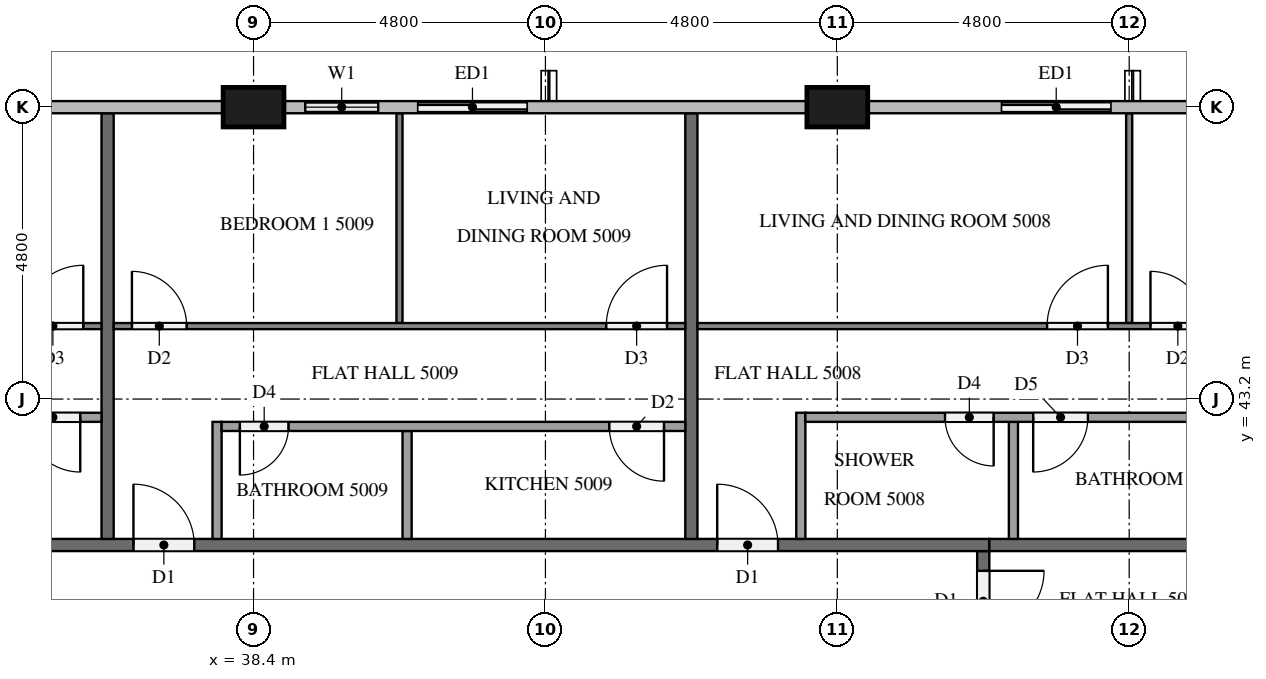
"""IFC4 building model, lengths in metres.
Left out: names, types, materials, properties, quantities, classifications, styles, units other than length and angle.
Written with IfcOpenShell. Run it as: python <this file> out.ifc"""

import sys

from ifc_helpers import new_model, si_unit, direction, frame, frame_2d, origin, origin_2d, place, context, subcontext, project, spatial, rectangle, extrude, element, fill, save


model = new_model("IFC4")
c1 = context("Model", 3, precision=1e-05, world=origin(), true_north=direction((0.0, 1.0)))
c2 = subcontext(c1, "Body", "Model", "MODEL_VIEW")
j1 = project(units=[si_unit("LENGTHUNIT", "METRE"), si_unit("PLANEANGLEUNIT", "RADIAN")], contexts=[c1])
p1 = place(None, origin())
s1 = spatial("IfcSite", under=j1, at=p1, CompositionType="ELEMENT")
p2 = place(p1, origin())
s2 = spatial("IfcBuilding", under=s1, at=p2, CompositionType="ELEMENT")
p3 = place(p2, frame((0.0, 0.0, 192.9)))
s3 = spatial("IfcBuildingStorey", under=s2, at=p3, CompositionType="ELEMENT", Elevation=192.9)
for number, where, z_axis, x_axis in (
    (1, (48.0, 48.0, 0.0), (0.0, 0.0, 1.0), (1.0, 0.0, 0.0)),
    (2, (38.4, 48.0, 0.0), (0.0, 0.0, 1.0), (1.0, 0.0, 0.0)),
):
    element("IfcColumn", number, at=place(p3, frame(where, z_axis=z_axis, x_axis=x_axis)), inside=s3, PredefinedType="COLUMN", context=c2, shape_type="SweptSolid", body=[
        extrude(rectangle(XDim=1.0, YDim=0.65, at=origin_2d()), origin(), (0.0, 0.0, 1.0), 3.2),
    ])
p4 = place(p3, frame((52.8, 48.0, 0.0), z_axis=(0.0, 0.0, 1.0), x_axis=(-1.0, 0.0, 0.0)))
e3 = element("IfcWall", 3, at=p4, inside=s3, PredefinedType="SOLIDWALL", context=c2, shape_type="SweptSolid", body=[
    extrude(rectangle(XDim=2.4, YDim=0.15, at=frame_2d((1.2, 0.0))), origin(), (0.0, 0.0, 1.0), 3.2),
])
p5 = place(p4, frame((0.3, 0.0, 0.0)))
e4 = element("IfcOpeningElement", 4, at=p5, cuts=e3, PredefinedType="OPENING", context=c2, shape_type="SweptSolid", body=[
    extrude(rectangle(XDim=1.8, YDim=2.4, at=frame_2d((0.9, 1.2))), frame((0.0, 0.085, 0.0), z_axis=(0.0, -1.0, 0.0), x_axis=(1.0, 0.0, 0.0)), (0.0, 0.0, 1.0), 0.17),
])
p6 = place(p3, frame((43.2, 48.0, 0.0), z_axis=(0.0, 0.0, 1.0), x_axis=(-1.0, 0.0, 0.0)))
e5 = element("IfcWall", 5, at=p6, inside=s3, PredefinedType="SOLIDWALL", context=c2, shape_type="SweptSolid", body=[
    extrude(rectangle(XDim=4.3, YDim=0.15, at=frame_2d((2.15, 0.0))), origin(), (0.0, 0.0, 1.0), 3.2),
])
p7 = place(p6, frame((0.3, 0.0, 0.0)))
e6 = element("IfcOpeningElement", 6, at=p7, cuts=e5, PredefinedType="OPENING", context=c2, shape_type="SweptSolid", body=[
    extrude(rectangle(XDim=1.8, YDim=2.4, at=frame_2d((0.9, 1.2))), frame((0.0, 0.085, 0.0), z_axis=(0.0, -1.0, 0.0), x_axis=(1.0, 0.0, 0.0)), (0.0, 0.0, 1.0), 0.17),
])
p8 = place(p6, frame((2.75, 0.0, 0.9)))
e7 = element("IfcOpeningElement", 7, at=p8, cuts=e5, PredefinedType="OPENING", context=c2, shape_type="SweptSolid", body=[
    extrude(rectangle(XDim=1.2, YDim=1.4, at=frame_2d((0.6, 0.7))), frame((0.0, 0.085, 0.0), z_axis=(0.0, -1.0, 0.0), x_axis=(1.0, 0.0, 0.0)), (0.0, 0.0, 1.0), 0.17),
])
p9 = place(p3, frame((50.4, 40.7, 0.0), z_axis=(0.0, 0.0, 1.0), x_axis=(0.0, -1.0, 0.0)))
e8 = element("IfcWall", 8, at=p9, inside=s3, PredefinedType="PARTITIONING", context=c2, shape_type="SweptSolid", body=[
    extrude(rectangle(XDim=28.6, YDim=0.2, at=frame_2d((14.3, 0.0))), origin(), (0.0, 0.0, 1.0), 3.2),
])
p10 = place(p9, frame((21.925, 0.0, 0.0)))
e9 = element("IfcOpeningElement", 9, at=p10, cuts=e8, PredefinedType="OPENING", context=c2, shape_type="SweptSolid", body=[
    extrude(rectangle(XDim=1.0, YDim=2.1, at=frame_2d((0.5, 1.05))), frame((0.0, 0.11, 0.0), z_axis=(0.0, -1.0, 0.0), x_axis=(1.0, 0.0, 0.0)), (0.0, 0.0, 1.0), 0.22),
])
p11 = place(p9, frame((20.075, 0.0, 0.0)))
e10 = element("IfcOpeningElement", 10, at=p11, cuts=e8, PredefinedType="OPENING", context=c2, shape_type="SweptSolid", body=[
    extrude(rectangle(XDim=1.0, YDim=2.1, at=frame_2d((0.5, 1.05))), frame((0.0, 0.11, 0.0), z_axis=(0.0, -1.0, 0.0), x_axis=(1.0, 0.0, 0.0)), (0.0, 0.0, 1.0), 0.22),
])
p12 = place(p9, frame((0.325, 0.0, 0.0)))
e11 = element("IfcOpeningElement", 11, at=p12, cuts=e8, PredefinedType="OPENING", context=c2, shape_type="SweptSolid", body=[
    extrude(rectangle(XDim=1.0, YDim=2.1, at=frame_2d((0.5, 1.05))), frame((0.0, 0.11, 0.0), z_axis=(0.0, -1.0, 0.0), x_axis=(1.0, 0.0, 0.0)), (0.0, 0.0, 1.0), 0.22),
])
p13 = place(p3, frame((11.9, 40.8, 0.0), z_axis=(0.0, 0.0, 1.0), x_axis=(1.0, 0.0, 0.0)))
e12 = element("IfcWall", 12, at=p13, inside=s3, PredefinedType="PARTITIONING", context=c2, shape_type="SweptSolid", body=[
    extrude(rectangle(XDim=38.6, YDim=0.2, at=frame_2d((19.3, 0.0))), origin(), (0.0, 0.0, 1.0), 3.2),
])
p14 = place(p13, frame((34.125, 0.0, 0.0)))
e13 = element("IfcOpeningElement", 13, at=p14, cuts=e12, PredefinedType="OPENING", context=c2, shape_type="SweptSolid", body=[
    extrude(rectangle(XDim=1.0, YDim=2.1, at=frame_2d((0.5, 1.05))), frame((0.0, 0.11, 0.0), z_axis=(0.0, -1.0, 0.0), x_axis=(1.0, 0.0, 0.0)), (0.0, 0.0, 1.0), 0.22),
])
p15 = place(p13, frame((24.525, 0.0, 0.0)))
e14 = element("IfcOpeningElement", 14, at=p15, cuts=e12, PredefinedType="OPENING", context=c2, shape_type="SweptSolid", body=[
    extrude(rectangle(XDim=1.0, YDim=2.1, at=frame_2d((0.5, 1.05))), frame((0.0, 0.11, 0.0), z_axis=(0.0, -1.0, 0.0), x_axis=(1.0, 0.0, 0.0)), (0.0, 0.0, 1.0), 0.22),
])
p16 = place(p13, frame((7.725, 0.0, 0.0)))
e15 = element("IfcOpeningElement", 15, at=p16, cuts=e12, PredefinedType="OPENING", context=c2, shape_type="SweptSolid", body=[
    extrude(rectangle(XDim=1.0, YDim=2.1, at=frame_2d((0.5, 1.05))), frame((0.0, 0.11, 0.0), z_axis=(0.0, -1.0, 0.0), x_axis=(1.0, 0.0, 0.0)), (0.0, 0.0, 1.0), 0.22),
])
p17 = place(p13, frame((5.875, 0.0, 0.0)))
e16 = element("IfcOpeningElement", 16, at=p17, cuts=e12, PredefinedType="OPENING", context=c2, shape_type="SweptSolid", body=[
    extrude(rectangle(XDim=1.0, YDim=2.1, at=frame_2d((0.5, 1.05))), frame((0.0, 0.11, 0.0), z_axis=(0.0, -1.0, 0.0), x_axis=(1.0, 0.0, 0.0)), (0.0, 0.0, 1.0), 0.22),
])
p18 = place(p3, frame((50.5, 40.8, 0.0), z_axis=(0.0, 0.0, 1.0), x_axis=(1.0, 0.0, 0.0)))
e17 = element("IfcWall", 17, at=p18, inside=s3, PredefinedType="PARTITIONING", context=c2, shape_type="SweptSolid", body=[
    extrude(rectangle(XDim=11.8, YDim=0.2, at=frame_2d((5.9, 0.0))), origin(), (0.0, 0.0, 1.0), 3.2),
])
for number, where, z_axis, x_axis in (
    (18, (45.6, 47.9, 0.0), (0.0, 0.0, 1.0), (0.0, -1.0, 0.0)),
    (19, (36.0, 47.9, 0.0), (0.0, 0.0, 1.0), (0.0, -1.0, 0.0)),
):
    element("IfcWall", number, at=place(p3, frame(where, z_axis=z_axis, x_axis=x_axis)), inside=s3, PredefinedType="PARTITIONING", context=c2, shape_type="SweptSolid", body=[
        extrude(rectangle(XDim=7.0, YDim=0.2, at=frame_2d((3.5, 0.0))), origin(), (0.0, 0.0, 1.0), 3.2),
    ])
p19 = place(p3, frame((52.8, 44.45, 0.0), z_axis=(0.0, 0.0, 1.0), x_axis=(0.0, 1.0, 0.0)))
e20 = element("IfcWall", 20, at=p19, inside=s3, PredefinedType="PARTITIONING", context=c2, shape_type="SweptSolid", body=[
    extrude(rectangle(XDim=3.45, YDim=0.1, at=frame_2d((1.725, 0.0))), origin(), (0.0, 0.0, 1.0), 3.2),
])
p20 = place(p3, frame((45.7, 44.4, 0.0), z_axis=(0.0, 0.0, 1.0), x_axis=(1.0, 0.0, 0.0)))
e21 = element("IfcWall", 21, at=p20, inside=s3, PredefinedType="PARTITIONING", context=c2, shape_type="SweptSolid", body=[
    extrude(rectangle(XDim=16.279, YDim=0.1, at=frame_2d((8.139, 0.0))), origin(), (0.0, 0.0, 1.0), 3.2),
])
p21 = place(p20, frame((5.75, 0.0, 0.0)))
e22 = element("IfcOpeningElement", 22, at=p21, cuts=e21, PredefinedType="OPENING", context=c2, shape_type="SweptSolid", body=[
    extrude(rectangle(XDim=1.0, YDim=2.1, at=frame_2d((0.5, 1.05))), frame((0.0, 0.06, 0.0), z_axis=(0.0, -1.0, 0.0), x_axis=(1.0, 0.0, 0.0)), (0.0, 0.0, 1.0), 0.12),
])
p22 = place(p20, frame((7.45, 0.0, 0.0)))
e23 = element("IfcOpeningElement", 23, at=p22, cuts=e21, PredefinedType="OPENING", context=c2, shape_type="SweptSolid", body=[
    extrude(rectangle(XDim=0.9, YDim=2.1, at=frame_2d((0.45, 1.05))), frame((0.0, 0.06, 0.0), z_axis=(0.0, -1.0, 0.0), x_axis=(1.0, 0.0, 0.0)), (0.0, 0.0, 1.0), 0.12),
])
p23 = place(p20, frame((15.079, 0.0, 0.0)))
e24 = element("IfcOpeningElement", 24, at=p23, cuts=e21, PredefinedType="OPENING", context=c2, shape_type="SweptSolid", body=[
    extrude(rectangle(XDim=0.9, YDim=2.1, at=frame_2d((0.45, 1.05))), frame((0.0, 0.06, 0.0), z_axis=(0.0, -1.0, 0.0), x_axis=(1.0, 0.0, 0.0)), (0.0, 0.0, 1.0), 0.12),
])
p24 = place(p3, frame((50.896, 40.9, 0.0), z_axis=(0.0, 0.0, 1.0), x_axis=(0.0, 1.0, 0.0)))
e25 = element("IfcWall", 25, at=p24, inside=s3, PredefinedType="PARTITIONING", context=c2, shape_type="SweptSolid", body=[
    extrude(rectangle(XDim=1.925, YDim=0.15, at=frame_2d((0.962, 0.0))), origin(), (0.0, 0.0, 1.0), 3.2),
])
p25 = place(p3, frame((47.4, 40.9, 0.0), z_axis=(0.0, 0.0, 1.0), x_axis=(0.0, 1.0, 0.0)))
e26 = element("IfcWall", 26, at=p25, inside=s3, PredefinedType="PARTITIONING", context=c2, shape_type="SweptSolid", body=[
    extrude(rectangle(XDim=2.075, YDim=0.15, at=frame_2d((1.038, 0.0))), origin(), (0.0, 0.0, 1.0), 3.2),
])
p26 = place(p3, frame((61.925, 42.9, 0.0), z_axis=(0.0, 0.0, 1.0), x_axis=(-1.0, 0.0, 0.0)))
e27 = element("IfcWall", 27, at=p26, inside=s3, PredefinedType="PARTITIONING", context=c2, shape_type="SweptSolid", body=[
    extrude(rectangle(XDim=14.45, YDim=0.15, at=frame_2d((7.225, 0.0))), origin(), (0.0, 0.0, 1.0), 3.2),
])
p27 = place(p26, frame((11.354, 0.0, 0.0)))
e28 = element("IfcOpeningElement", 28, at=p27, cuts=e27, PredefinedType="OPENING", context=c2, shape_type="SweptSolid", body=[
    extrude(rectangle(XDim=0.8, YDim=2.1, at=frame_2d((0.4, 1.05))), frame((0.0, 0.085, 0.0), z_axis=(0.0, -1.0, 0.0), x_axis=(1.0, 0.0, 0.0)), (0.0, 0.0, 1.0), 0.17),
])
p28 = place(p26, frame((9.804, 0.0, 0.0)))
e29 = element("IfcOpeningElement", 29, at=p28, cuts=e27, PredefinedType="OPENING", context=c2, shape_type="SweptSolid", body=[
    extrude(rectangle(XDim=0.9, YDim=2.1, at=frame_2d((0.45, 1.05))), frame((0.0, 0.085, 0.0), z_axis=(0.0, -1.0, 0.0), x_axis=(1.0, 0.0, 0.0)), (0.0, 0.0, 1.0), 0.17),
])
p29 = place(p26, frame((0.3, 0.0, 0.0)))
e30 = element("IfcOpeningElement", 30, at=p29, cuts=e27, PredefinedType="OPENING", context=c2, shape_type="SweptSolid", body=[
    extrude(rectangle(XDim=0.9, YDim=2.1, at=frame_2d((0.45, 1.05))), frame((0.0, 0.085, 0.0), z_axis=(0.0, -1.0, 0.0), x_axis=(1.0, 0.0, 0.0)), (0.0, 0.0, 1.0), 0.17),
])
p30 = place(p3, frame((40.8, 44.45, 0.0), z_axis=(0.0, 0.0, 1.0), x_axis=(0.0, 1.0, 0.0)))
e31 = element("IfcWall", 31, at=p30, inside=s3, PredefinedType="PARTITIONING", context=c2, shape_type="SweptSolid", body=[
    extrude(rectangle(XDim=3.45, YDim=0.1, at=frame_2d((1.725, 0.0))), origin(), (0.0, 0.0, 1.0), 3.2),
])
p31 = place(p3, frame((36.1, 44.4, 0.0), z_axis=(0.0, 0.0, 1.0), x_axis=(1.0, 0.0, 0.0)))
e32 = element("IfcWall", 32, at=p31, inside=s3, PredefinedType="PARTITIONING", context=c2, shape_type="SweptSolid", body=[
    extrude(rectangle(XDim=9.4, YDim=0.1, at=frame_2d((4.7, 0.0))), origin(), (0.0, 0.0, 1.0), 3.2),
])
p32 = place(p31, frame((0.3, 0.0, 0.0)))
e33 = element("IfcOpeningElement", 33, at=p32, cuts=e32, PredefinedType="OPENING", context=c2, shape_type="SweptSolid", body=[
    extrude(rectangle(XDim=0.9, YDim=2.1, at=frame_2d((0.45, 1.05))), frame((0.0, 0.06, 0.0), z_axis=(0.0, -1.0, 0.0), x_axis=(1.0, 0.0, 0.0)), (0.0, 0.0, 1.0), 0.12),
])
p33 = place(p31, frame((8.1, 0.0, 0.0)))
e34 = element("IfcOpeningElement", 34, at=p33, cuts=e32, PredefinedType="OPENING", context=c2, shape_type="SweptSolid", body=[
    extrude(rectangle(XDim=1.0, YDim=2.1, at=frame_2d((0.5, 1.05))), frame((0.0, 0.06, 0.0), z_axis=(0.0, -1.0, 0.0), x_axis=(1.0, 0.0, 0.0)), (0.0, 0.0, 1.0), 0.12),
])
p34 = place(p3, frame((40.925, 40.9, 0.0), z_axis=(0.0, 0.0, 1.0), x_axis=(0.0, 1.0, 0.0)))
e35 = element("IfcWall", 35, at=p34, inside=s3, PredefinedType="PARTITIONING", context=c2, shape_type="SweptSolid", body=[
    extrude(rectangle(XDim=1.775, YDim=0.15, at=frame_2d((0.888, 0.0))), origin(), (0.0, 0.0, 1.0), 3.2),
])
p35 = place(p3, frame((37.8, 40.9, 0.0), z_axis=(0.0, 0.0, 1.0), x_axis=(0.0, 1.0, 0.0)))
e36 = element("IfcWall", 36, at=p35, inside=s3, PredefinedType="PARTITIONING", context=c2, shape_type="SweptSolid", body=[
    extrude(rectangle(XDim=1.925, YDim=0.15, at=frame_2d((0.962, 0.0))), origin(), (0.0, 0.0, 1.0), 3.2),
])
p36 = place(p3, frame((45.5, 42.75, 0.0), z_axis=(0.0, 0.0, 1.0), x_axis=(-1.0, 0.0, 0.0)))
e37 = element("IfcWall", 37, at=p36, inside=s3, PredefinedType="PARTITIONING", context=c2, shape_type="SweptSolid", body=[
    extrude(rectangle(XDim=7.625, YDim=0.15, at=frame_2d((3.812, 0.0))), origin(), (0.0, 0.0, 1.0), 3.2),
])
p37 = place(p36, frame((6.525, 0.0, 0.0)))
e38 = element("IfcOpeningElement", 38, at=p37, cuts=e37, PredefinedType="OPENING", context=c2, shape_type="SweptSolid", body=[
    extrude(rectangle(XDim=0.8, YDim=2.1, at=frame_2d((0.4, 1.05))), frame((0.0, 0.085, 0.0), z_axis=(0.0, -1.0, 0.0), x_axis=(1.0, 0.0, 0.0)), (0.0, 0.0, 1.0), 0.17),
])
p38 = place(p36, frame((0.35, 0.0, 0.0)))
e39 = element("IfcOpeningElement", 39, at=p38, cuts=e37, PredefinedType="OPENING", context=c2, shape_type="SweptSolid", body=[
    extrude(rectangle(XDim=0.9, YDim=2.1, at=frame_2d((0.45, 1.05))), frame((0.0, 0.085, 0.0), z_axis=(0.0, -1.0, 0.0), x_axis=(1.0, 0.0, 0.0)), (0.0, 0.0, 1.0), 0.17),
])
p39 = place(p3, frame((19.3, 44.4, 0.0), z_axis=(0.0, 0.0, 1.0), x_axis=(1.0, 0.0, 0.0)))
e40 = element("IfcWall", 40, at=p39, inside=s3, PredefinedType="PARTITIONING", context=c2, shape_type="SweptSolid", body=[
    extrude(rectangle(XDim=16.6, YDim=0.1, at=frame_2d((8.3, 0.0))), origin(), (0.0, 0.0, 1.0), 3.2),
])
p40 = place(p39, frame((3.45, 0.0, 0.0)))
e41 = element("IfcOpeningElement", 41, at=p40, cuts=e40, PredefinedType="OPENING", context=c2, shape_type="SweptSolid", body=[
    extrude(rectangle(XDim=0.9, YDim=2.1, at=frame_2d((0.45, 1.05))), frame((0.0, 0.06, 0.0), z_axis=(0.0, -1.0, 0.0), x_axis=(1.0, 0.0, 0.0)), (0.0, 0.0, 1.0), 0.12),
])
p41 = place(p39, frame((5.05, 0.0, 0.0)))
e42 = element("IfcOpeningElement", 42, at=p41, cuts=e40, PredefinedType="OPENING", context=c2, shape_type="SweptSolid", body=[
    extrude(rectangle(XDim=0.9, YDim=2.1, at=frame_2d((0.45, 1.05))), frame((0.0, 0.06, 0.0), z_axis=(0.0, -1.0, 0.0), x_axis=(1.0, 0.0, 0.0)), (0.0, 0.0, 1.0), 0.12),
])
p42 = place(p39, frame((15.3, 0.0, 0.0)))
e43 = element("IfcOpeningElement", 43, at=p42, cuts=e40, PredefinedType="OPENING", context=c2, shape_type="SweptSolid", body=[
    extrude(rectangle(XDim=1.0, YDim=2.1, at=frame_2d((0.5, 1.05))), frame((0.0, 0.06, 0.0), z_axis=(0.0, -1.0, 0.0), x_axis=(1.0, 0.0, 0.0)), (0.0, 0.0, 1.0), 0.12),
])
p43 = place(p3, frame((35.9, 42.9, 0.0), z_axis=(0.0, 0.0, 1.0), x_axis=(-1.0, 0.0, 0.0)))
e44 = element("IfcWall", 44, at=p43, inside=s3, PredefinedType="PARTITIONING", context=c2, shape_type="SweptSolid", body=[
    extrude(rectangle(XDim=14.825, YDim=0.15, at=frame_2d((7.413, 0.0))), origin(), (0.0, 0.0, 1.0), 3.2),
])
p44 = place(p43, frame((8.308, 0.0, 0.0)))
e45 = element("IfcOpeningElement", 45, at=p44, cuts=e44, PredefinedType="OPENING", context=c2, shape_type="SweptSolid", body=[
    extrude(rectangle(XDim=0.9, YDim=2.1, at=frame_2d((0.45, 1.05))), frame((0.0, 0.085, 0.0), z_axis=(0.0, -1.0, 0.0), x_axis=(1.0, 0.0, 0.0)), (0.0, 0.0, 1.0), 0.17),
])
p45 = place(p43, frame((6.858, 0.0, 0.0)))
e46 = element("IfcOpeningElement", 46, at=p45, cuts=e44, PredefinedType="OPENING", context=c2, shape_type="SweptSolid", body=[
    extrude(rectangle(XDim=0.8, YDim=2.1, at=frame_2d((0.4, 1.05))), frame((0.0, 0.085, 0.0), z_axis=(0.0, -1.0, 0.0), x_axis=(1.0, 0.0, 0.0)), (0.0, 0.0, 1.0), 0.17),
])
p46 = place(p43, frame((0.35, 0.0, 0.0)))
e47 = element("IfcOpeningElement", 47, at=p46, cuts=e44, PredefinedType="OPENING", context=c2, shape_type="SweptSolid", body=[
    extrude(rectangle(XDim=0.9, YDim=2.1, at=frame_2d((0.45, 1.05))), frame((0.0, 0.085, 0.0), z_axis=(0.0, -1.0, 0.0), x_axis=(1.0, 0.0, 0.0)), (0.0, 0.0, 1.0), 0.17),
])
p47 = place(p5, origin())
e48 = element("IfcDoor", 48, at=p47, inside=s3, OperationType="SLIDING_TO_LEFT", PredefinedType="DOOR", context=c2, shape_type="SweptSolid", body=[
    extrude(rectangle(XDim=1.8, YDim=2.4, at=frame_2d((0.9, 1.2))), frame((0.0, 0.025, 0.0), z_axis=(0.0, -1.0, 0.0), x_axis=(1.0, 0.0, 0.0)), (0.0, 0.0, 1.0), 0.05),
])
fill(e4, e48)
p48 = place(p7, origin())
e49 = element("IfcDoor", 49, at=p48, inside=s3, OperationType="SLIDING_TO_RIGHT", PredefinedType="DOOR", context=c2, shape_type="SweptSolid", body=[
    extrude(rectangle(XDim=1.8, YDim=2.4, at=frame_2d((0.9, 1.2))), frame((0.0, 0.025, 0.0), z_axis=(0.0, -1.0, 0.0), x_axis=(1.0, 0.0, 0.0)), (0.0, 0.0, 1.0), 0.05),
])
fill(e6, e49)
p49 = place(p8, origin())
e50 = element("IfcWindow", 50, at=p49, inside=s3, PartitioningType="SINGLE_PANEL", PredefinedType="WINDOW", context=c2, shape_type="SweptSolid", body=[
    extrude(rectangle(XDim=1.2, YDim=1.4, at=frame_2d((0.6, 0.7))), frame((0.0, 0.03, 0.0), z_axis=(0.0, -1.0, 0.0), x_axis=(1.0, 0.0, 0.0)), (0.0, 0.0, 1.0), 0.06),
])
fill(e7, e50)
p50 = place(p12, origin())
e51 = element("IfcDoor", 51, at=p50, inside=s3, OperationType="SINGLE_SWING_LEFT", PredefinedType="DOOR", context=c2, shape_type="SweptSolid", body=[
    extrude(rectangle(XDim=1.0, YDim=2.1, at=frame_2d((0.5, 1.05))), frame((0.0, 0.025, 0.0), z_axis=(0.0, -1.0, 0.0), x_axis=(1.0, 0.0, 0.0)), (0.0, 0.0, 1.0), 0.05),
])
fill(e11, e51)
p51 = place(p14, origin())
e52 = element("IfcDoor", 52, at=p51, inside=s3, OperationType="SINGLE_SWING_LEFT", PredefinedType="DOOR", context=c2, shape_type="SweptSolid", body=[
    extrude(rectangle(XDim=1.0, YDim=2.1, at=frame_2d((0.5, 1.05))), frame((0.0, 0.025, 0.0), z_axis=(0.0, -1.0, 0.0), x_axis=(1.0, 0.0, 0.0)), (0.0, 0.0, 1.0), 0.05),
])
fill(e13, e52)
p52 = place(p15, origin())
e53 = element("IfcDoor", 53, at=p52, inside=s3, OperationType="SINGLE_SWING_LEFT", PredefinedType="DOOR", context=c2, shape_type="SweptSolid", body=[
    extrude(rectangle(XDim=1.0, YDim=2.1, at=frame_2d((0.5, 1.05))), frame((0.0, 0.025, 0.0), z_axis=(0.0, -1.0, 0.0), x_axis=(1.0, 0.0, 0.0)), (0.0, 0.0, 1.0), 0.05),
])
fill(e14, e53)
p53 = place(p21, origin())
e54 = element("IfcDoor", 54, at=p53, inside=s3, OperationType="SINGLE_SWING_RIGHT", PredefinedType="DOOR", context=c2, shape_type="SweptSolid", body=[
    extrude(rectangle(XDim=1.0, YDim=2.1, at=frame_2d((0.5, 1.05))), frame((0.0, 0.025, 0.0), z_axis=(0.0, -1.0, 0.0), x_axis=(1.0, 0.0, 0.0)), (0.0, 0.0, 1.0), 0.05),
])
fill(e22, e54)
p54 = place(p22, origin())
e55 = element("IfcDoor", 55, at=p54, inside=s3, OperationType="SINGLE_SWING_LEFT", PredefinedType="DOOR", context=c2, shape_type="SweptSolid", body=[
    extrude(rectangle(XDim=0.9, YDim=2.1, at=frame_2d((0.45, 1.05))), frame((0.0, 0.025, 0.0), z_axis=(0.0, -1.0, 0.0), x_axis=(1.0, 0.0, 0.0)), (0.0, 0.0, 1.0), 0.05),
])
fill(e23, e55)
p55 = place(p27, origin())
e56 = element("IfcDoor", 56, at=p55, inside=s3, OperationType="SINGLE_SWING_LEFT", PredefinedType="DOOR", context=c2, shape_type="SweptSolid", body=[
    extrude(rectangle(XDim=0.8, YDim=2.1, at=frame_2d((0.4, 1.05))), frame((0.0, 0.025, 0.0), z_axis=(0.0, -1.0, 0.0), x_axis=(1.0, 0.0, 0.0)), (0.0, 0.0, 1.0), 0.05),
])
fill(e28, e56)
p56 = place(p28, origin())
e57 = element("IfcDoor", 57, at=p56, inside=s3, OperationType="SINGLE_SWING_RIGHT", PredefinedType="DOOR", context=c2, shape_type="SweptSolid", body=[
    extrude(rectangle(XDim=0.9, YDim=2.1, at=frame_2d((0.45, 1.05))), frame((0.0, 0.025, 0.0), z_axis=(0.0, -1.0, 0.0), x_axis=(1.0, 0.0, 0.0)), (0.0, 0.0, 1.0), 0.05),
])
fill(e29, e57)
p57 = place(p32, origin())
e58 = element("IfcDoor", 58, at=p57, inside=s3, OperationType="SINGLE_SWING_LEFT", PredefinedType="DOOR", context=c2, shape_type="SweptSolid", body=[
    extrude(rectangle(XDim=0.9, YDim=2.1, at=frame_2d((0.45, 1.05))), frame((0.0, 0.025, 0.0), z_axis=(0.0, -1.0, 0.0), x_axis=(1.0, 0.0, 0.0)), (0.0, 0.0, 1.0), 0.05),
])
fill(e33, e58)
p58 = place(p33, origin())
e59 = element("IfcDoor", 59, at=p58, inside=s3, OperationType="SINGLE_SWING_RIGHT", PredefinedType="DOOR", context=c2, shape_type="SweptSolid", body=[
    extrude(rectangle(XDim=1.0, YDim=2.1, at=frame_2d((0.5, 1.05))), frame((0.0, 0.025, 0.0), z_axis=(0.0, -1.0, 0.0), x_axis=(1.0, 0.0, 0.0)), (0.0, 0.0, 1.0), 0.05),
])
fill(e34, e59)
p59 = place(p37, origin())
e60 = element("IfcDoor", 60, at=p59, inside=s3, OperationType="SINGLE_SWING_RIGHT", PredefinedType="DOOR", context=c2, shape_type="SweptSolid", body=[
    extrude(rectangle(XDim=0.8, YDim=2.1, at=frame_2d((0.4, 1.05))), frame((0.0, 0.025, 0.0), z_axis=(0.0, -1.0, 0.0), x_axis=(1.0, 0.0, 0.0)), (0.0, 0.0, 1.0), 0.05),
])
fill(e38, e60)
p60 = place(p38, origin())
e61 = element("IfcDoor", 61, at=p60, inside=s3, OperationType="SINGLE_SWING_LEFT", PredefinedType="DOOR", context=c2, shape_type="SweptSolid", body=[
    extrude(rectangle(XDim=0.9, YDim=2.1, at=frame_2d((0.45, 1.05))), frame((0.0, 0.025, 0.0), z_axis=(0.0, -1.0, 0.0), x_axis=(1.0, 0.0, 0.0)), (0.0, 0.0, 1.0), 0.05),
])
fill(e39, e61)
p61 = place(p42, origin())
e62 = element("IfcDoor", 62, at=p61, inside=s3, OperationType="SINGLE_SWING_RIGHT", PredefinedType="DOOR", context=c2, shape_type="SweptSolid", body=[
    extrude(rectangle(XDim=1.0, YDim=2.1, at=frame_2d((0.5, 1.05))), frame((0.0, 0.025, 0.0), z_axis=(0.0, -1.0, 0.0), x_axis=(1.0, 0.0, 0.0)), (0.0, 0.0, 1.0), 0.05),
])
fill(e43, e62)
p62 = place(p46, origin())
e63 = element("IfcDoor", 63, at=p62, inside=s3, OperationType="SINGLE_SWING_LEFT", PredefinedType="DOOR", context=c2, shape_type="SweptSolid", body=[
    extrude(rectangle(XDim=0.9, YDim=2.1, at=frame_2d((0.45, 1.05))), frame((0.0, 0.025, 0.0), z_axis=(0.0, -1.0, 0.0), x_axis=(1.0, 0.0, 0.0)), (0.0, 0.0, 1.0), 0.05),
])
fill(e47, e63)
save(model, sys.argv[1])
